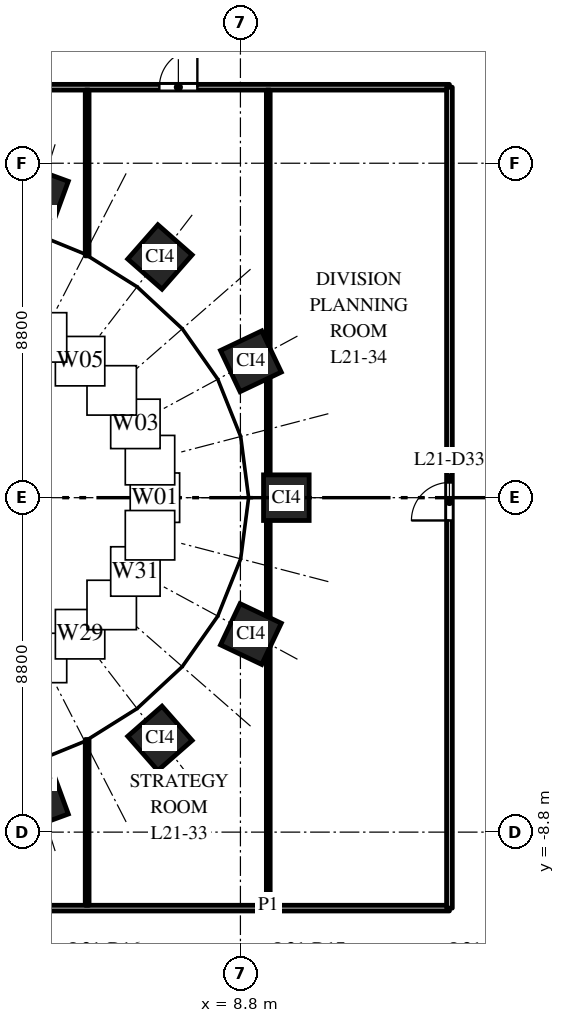
"""IFC4 building model, lengths in metres.
Left out: names, types, materials, properties, quantities, classifications, styles, units other than length and angle.
Written with IfcOpenShell. Run it as: python <this file> out.ifc"""

import sys

from ifc_helpers import new_model, si_unit, direction, frame, frame_2d, origin, origin_2d, place, context, subcontext, project, spatial, rectangle, extrude, element, fill, save


model = new_model("IFC4")
c1 = context("Model", 3, precision=1e-05, world=origin(), true_north=direction((0.0, 1.0)))
c2 = subcontext(c1, "Body", "Model", "MODEL_VIEW")
j1 = project(units=[si_unit("LENGTHUNIT", "METRE"), si_unit("PLANEANGLEUNIT", "RADIAN")], contexts=[c1])
p1 = place(None, origin())
s1 = spatial("IfcSite", under=j1, at=p1, CompositionType="ELEMENT")
p2 = place(p1, origin())
s2 = spatial("IfcBuilding", under=s1, at=p2, CompositionType="ELEMENT")
p3 = place(p2, frame((0.0, 0.0, 96.0)))
s3 = spatial("IfcBuildingStorey", under=s2, at=p3, CompositionType="ELEMENT", Elevation=96.0)
for number, where, z_axis, x_axis in (
    (1, (10.008, 0.0, 0.0), (0.0, 0.0, 1.0), (0.0, 1.0, 0.0)),
    (2, (9.076, 3.588, 0.0), (0.0, 0.0, 1.0), (-0.429, 0.903, 0.0)),
    (3, (6.682, 6.334, 0.0), (0.0, 0.0, 1.0), (-0.751, 0.66, 0.0)),
    (4, (3.501, 7.967, 0.0), (0.0, 0.0, 1.0), (-0.939, 0.344, 0.0)),
    (5, (3.501, -7.967, 0.0), (0.0, 0.0, 1.0), (0.939, 0.344, 0.0)),
    (6, (6.682, -6.334, 0.0), (0.0, 0.0, 1.0), (0.751, 0.66, 0.0)),
    (7, (9.076, -3.588, 0.0), (0.0, 0.0, 1.0), (0.429, 0.903, 0.0)),
):
    element("IfcColumn", number, at=place(p3, frame(where, z_axis=z_axis, x_axis=x_axis)), inside=s3, PredefinedType="COLUMN", context=c2, shape_type="SweptSolid", body=[
        extrude(rectangle(XDim=1.2, YDim=1.2, at=origin_2d()), origin(), (0.0, 0.0, 1.0), 4.0),
    ])
p4 = place(p3, frame((-14.3, -10.8, 0.0), z_axis=(0.0, 0.0, 1.0), x_axis=(1.0, 0.0, 0.0)))
e8 = element("IfcWall", 8, at=p4, inside=s3, PredefinedType="PARTITIONING", context=c2, shape_type="SweptSolid", body=[
    extrude(rectangle(XDim=28.6, YDim=0.15, at=frame_2d((14.3, 0.0))), origin(), (0.0, 0.0, 1.0), 2.85),
])
p5 = place(p4, frame((11.4, 0.0, 0.0)))
e9 = element("IfcOpeningElement", 9, at=p5, cuts=e8, PredefinedType="OPENING", context=c2, shape_type="SweptSolid", body=[
    extrude(rectangle(XDim=1.0, YDim=2.1, at=frame_2d((0.5, 1.05))), frame((0.0, 0.085, 0.0), z_axis=(0.0, -1.0, 0.0), x_axis=(1.0, 0.0, 0.0)), (0.0, 0.0, 1.0), 0.17),
])
p6 = place(p4, frame((16.167, 0.0, 0.0)))
e10 = element("IfcOpeningElement", 10, at=p6, cuts=e8, PredefinedType="OPENING", context=c2, shape_type="SweptSolid", body=[
    extrude(rectangle(XDim=1.0, YDim=2.1, at=frame_2d((0.5, 1.05))), frame((0.0, 0.085, 0.0), z_axis=(0.0, -1.0, 0.0), x_axis=(1.0, 0.0, 0.0)), (0.0, 0.0, 1.0), 0.17),
])
p7 = place(p3, frame((-14.3, 10.8, 0.0), z_axis=(0.0, 0.0, 1.0), x_axis=(1.0, 0.0, 0.0)))
e11 = element("IfcWall", 11, at=p7, inside=s3, PredefinedType="PARTITIONING", context=c2, shape_type="SweptSolid", body=[
    extrude(rectangle(XDim=28.6, YDim=0.15, at=frame_2d((14.3, 0.0))), origin(), (0.0, 0.0, 1.0), 2.85),
])
p8 = place(p7, frame((11.433, 0.0, 0.0)))
e12 = element("IfcOpeningElement", 12, at=p8, cuts=e11, PredefinedType="OPENING", context=c2, shape_type="SweptSolid", body=[
    extrude(rectangle(XDim=1.0, YDim=2.1, at=frame_2d((0.5, 1.05))), frame((0.0, 0.085, 0.0), z_axis=(0.0, -1.0, 0.0), x_axis=(1.0, 0.0, 0.0)), (0.0, 0.0, 1.0), 0.17),
])
p9 = place(p7, frame((16.2, 0.0, 0.0)))
e13 = element("IfcOpeningElement", 13, at=p9, cuts=e11, PredefinedType="OPENING", context=c2, shape_type="SweptSolid", body=[
    extrude(rectangle(XDim=1.0, YDim=2.1, at=frame_2d((0.5, 1.05))), frame((0.0, 0.085, 0.0), z_axis=(0.0, -1.0, 0.0), x_axis=(1.0, 0.0, 0.0)), (0.0, 0.0, 1.0), 0.17),
])
p10 = place(p7, frame((20.967, 0.0, 0.0)))
e14 = element("IfcOpeningElement", 14, at=p10, cuts=e11, PredefinedType="OPENING", context=c2, shape_type="SweptSolid", body=[
    extrude(rectangle(XDim=1.0, YDim=2.1, at=frame_2d((0.5, 1.05))), frame((0.0, 0.085, 0.0), z_axis=(0.0, -1.0, 0.0), x_axis=(1.0, 0.0, 0.0)), (0.0, 0.0, 1.0), 0.17),
])
for number, where, z_axis, x_axis in (
    (15, (4.767, -10.725, 0.0), (0.0, 0.0, 1.0), (0.0, 1.0, 0.0)),
    (16, (4.767, 6.363, 0.0), (0.0, 0.0, 1.0), (0.0, 1.0, 0.0)),
):
    element("IfcWall", number, at=place(p3, frame(where, z_axis=z_axis, x_axis=x_axis)), inside=s3, PredefinedType="PARTITIONING", context=c2, shape_type="SweptSolid", body=[
        extrude(rectangle(XDim=4.362, YDim=0.1, at=frame_2d((2.181, 0.0))), origin(), (0.0, 0.0, 1.0), 2.85),
    ])
p11 = place(p3, frame((9.533, -10.725, 0.0), z_axis=(0.0, 0.0, 1.0), x_axis=(0.0, 1.0, 0.0)))
e17 = element("IfcWall", 17, at=p11, inside=s3, PredefinedType="PARTITIONING", context=c2, shape_type="SweptSolid", body=[
    extrude(rectangle(XDim=21.45, YDim=0.1, at=frame_2d((10.725, 0.0))), origin(), (0.0, 0.0, 1.0), 2.75),
])
p12 = place(p3, frame((14.3, -10.8, 0.0), z_axis=(0.0, 0.0, 1.0), x_axis=(0.0, 1.0, 0.0)))
e18 = element("IfcWall", 18, at=p12, inside=s3, PredefinedType="PARTITIONING", context=c2, shape_type="SweptSolid", body=[
    extrude(rectangle(XDim=21.6, YDim=0.15, at=frame_2d((10.8, 0.0))), origin(), (0.0, 0.0, 1.0), 2.75),
])
p13 = place(p12, frame((10.2, 0.0, 0.0)))
e19 = element("IfcOpeningElement", 19, at=p13, cuts=e18, PredefinedType="OPENING", context=c2, shape_type="SweptSolid", body=[
    extrude(rectangle(XDim=1.0, YDim=2.1, at=frame_2d((0.5, 1.05))), frame((0.0, 0.085, 0.0), z_axis=(0.0, -1.0, 0.0), x_axis=(1.0, 0.0, 0.0)), (0.0, 0.0, 1.0), 0.17),
])
p14 = place(p10, origin())
e20 = element("IfcDoor", 20, at=p14, inside=s3, OperationType="SINGLE_SWING_RIGHT", PredefinedType="DOOR", context=c2, shape_type="SweptSolid", body=[
    extrude(rectangle(XDim=1.0, YDim=2.1, at=frame_2d((0.5, 1.05))), frame((0.0, 0.025, 0.0), z_axis=(0.0, -1.0, 0.0), x_axis=(1.0, 0.0, 0.0)), (0.0, 0.0, 1.0), 0.05),
])
fill(e14, e20)
p15 = place(p13, origin())
e21 = element("IfcDoor", 21, at=p15, inside=s3, OperationType="SINGLE_SWING_LEFT", PredefinedType="DOOR", context=c2, shape_type="SweptSolid", body=[
    extrude(rectangle(XDim=1.0, YDim=2.1, at=frame_2d((0.5, 1.05))), frame((0.0, 0.025, 0.0), z_axis=(0.0, -1.0, 0.0), x_axis=(1.0, 0.0, 0.0)), (0.0, 0.0, 1.0), 0.05),
])
fill(e19, e21)
save(model, sys.argv[1])
